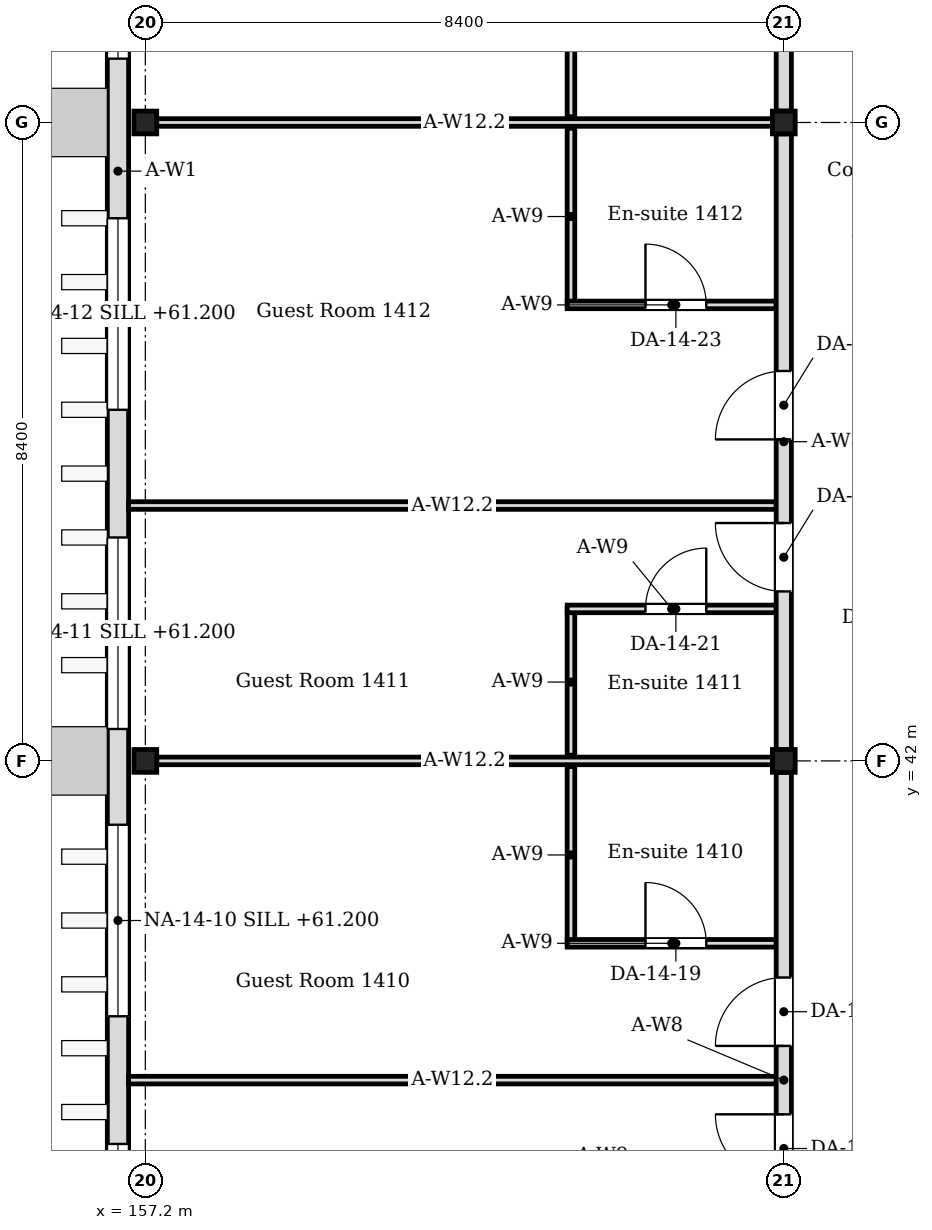
"""IFC4 building model, lengths in metres.
Left out: names, types, materials, properties, quantities, classifications, styles, units other than length and angle.
Written with IfcOpenShell. Run it as: python <this file> out.ifc"""

import sys

from ifc_helpers import new_model, si_unit, direction, frame, frame_2d, origin, origin_2d, place, context, subcontext, project, spatial, rectangle, i_section, extrude, element, fill, save


model = new_model("IFC4")
c1 = context("Model", 3, precision=1e-05, world=origin(), true_north=direction((0.0, 1.0)))
c2 = subcontext(c1, "Body", "Model", "MODEL_VIEW")
j1 = project(units=[si_unit("LENGTHUNIT", "METRE"), si_unit("PLANEANGLEUNIT", "RADIAN")], contexts=[c1])
p1 = place(None, origin())
s1 = spatial("IfcSite", under=j1, at=p1, CompositionType="ELEMENT")
p2 = place(p1, origin())
s2 = spatial("IfcBuilding", under=s1, at=p2, CompositionType="ELEMENT")
p3 = place(p2, frame((0.0, 0.0, 60.6)))
s3 = spatial("IfcBuildingStorey", under=s2, at=p3, CompositionType="ELEMENT", Elevation=60.6)
for number, where, z_axis, x_axis in (
    (1, (157.2, 42.0, 0.0), (0.0, 0.0, 1.0), (1.0, 0.0, 0.0)),
    (2, (157.2, 50.4, 0.0), (0.0, 0.0, 1.0), (1.0, 0.0, 0.0)),
    (3, (165.6, 42.0, 0.0), (0.0, 0.0, 1.0), (1.0, 0.0, 0.0)),
    (4, (165.6, 50.4, 0.0), (0.0, 0.0, 1.0), (1.0, 0.0, 0.0)),
):
    element("IfcColumn", number, at=place(p3, frame(where, z_axis=z_axis, x_axis=x_axis)), inside=s3, PredefinedType="COLUMN", context=c2, shape_type="SweptSolid", body=[
        extrude(i_section(OverallWidth=0.3, OverallDepth=0.3, WebThickness=0.01, FlangeThickness=0.015, FilletRadius=0.013, at=origin_2d()), origin(), (0.0, 0.0, 1.0), 4.2),
    ])
p4 = place(p3, frame((156.84, -0.22, 0.0), z_axis=(0.0, 0.0, 1.0), x_axis=(0.0, 1.0, 0.0)))
e5 = element("IfcWall", 5, at=p4, inside=s3, PredefinedType="SOLIDWALL", context=c2, shape_type="SweptSolid", body=[
    extrude(rectangle(XDim=67.64, YDim=0.28, at=frame_2d((33.82, 0.0))), origin(), (0.0, 0.0, 1.0), 4.05),
])
p5 = place(p4, frame((0.64, 0.0, 0.6)))
e6 = element("IfcOpeningElement", 6, at=p5, cuts=e5, PredefinedType="OPENING", context=c2, shape_type="SweptSolid", body=[
    extrude(rectangle(XDim=2.52, YDim=2.4, at=frame_2d((1.26, 1.2))), frame((0.0, 0.15, 0.0), z_axis=(0.0, -1.0, 0.0), x_axis=(1.0, 0.0, 0.0)), (0.0, 0.0, 1.0), 0.3),
])
p6 = place(p4, frame((4.84, 0.0, 0.6)))
e7 = element("IfcOpeningElement", 7, at=p6, cuts=e5, PredefinedType="OPENING", context=c2, shape_type="SweptSolid", body=[
    extrude(rectangle(XDim=2.52, YDim=2.4, at=frame_2d((1.26, 1.2))), frame((0.0, 0.15, 0.0), z_axis=(0.0, -1.0, 0.0), x_axis=(1.0, 0.0, 0.0)), (0.0, 0.0, 1.0), 0.3),
])
p7 = place(p4, frame((9.46, 0.0, 0.6)))
e8 = element("IfcOpeningElement", 8, at=p7, cuts=e5, PredefinedType="OPENING", context=c2, shape_type="SweptSolid", body=[
    extrude(rectangle(XDim=2.52, YDim=2.4, at=frame_2d((1.26, 1.2))), frame((0.0, 0.15, 0.0), z_axis=(0.0, -1.0, 0.0), x_axis=(1.0, 0.0, 0.0)), (0.0, 0.0, 1.0), 0.3),
])
p8 = place(p4, frame((13.66, 0.0, 0.6)))
e9 = element("IfcOpeningElement", 9, at=p8, cuts=e5, PredefinedType="OPENING", context=c2, shape_type="SweptSolid", body=[
    extrude(rectangle(XDim=2.52, YDim=2.4, at=frame_2d((1.26, 1.2))), frame((0.0, 0.15, 0.0), z_axis=(0.0, -1.0, 0.0), x_axis=(1.0, 0.0, 0.0)), (0.0, 0.0, 1.0), 0.3),
])
p9 = place(p4, frame((17.86, 0.0, 0.6)))
e10 = element("IfcOpeningElement", 10, at=p9, cuts=e5, PredefinedType="OPENING", context=c2, shape_type="SweptSolid", body=[
    extrude(rectangle(XDim=2.52, YDim=2.4, at=frame_2d((1.26, 1.2))), frame((0.0, 0.15, 0.0), z_axis=(0.0, -1.0, 0.0), x_axis=(1.0, 0.0, 0.0)), (0.0, 0.0, 1.0), 0.3),
])
p10 = place(p4, frame((22.06, 0.0, 0.6)))
e11 = element("IfcOpeningElement", 11, at=p10, cuts=e5, PredefinedType="OPENING", context=c2, shape_type="SweptSolid", body=[
    extrude(rectangle(XDim=2.52, YDim=2.4, at=frame_2d((1.26, 1.2))), frame((0.0, 0.15, 0.0), z_axis=(0.0, -1.0, 0.0), x_axis=(1.0, 0.0, 0.0)), (0.0, 0.0, 1.0), 0.3),
])
p11 = place(p4, frame((25.84, 0.0, 0.6)))
e12 = element("IfcOpeningElement", 12, at=p11, cuts=e5, PredefinedType="OPENING", context=c2, shape_type="SweptSolid", body=[
    extrude(rectangle(XDim=2.52, YDim=2.4, at=frame_2d((1.26, 1.2))), frame((0.0, 0.15, 0.0), z_axis=(0.0, -1.0, 0.0), x_axis=(1.0, 0.0, 0.0)), (0.0, 0.0, 1.0), 0.3),
])
p12 = place(p4, frame((30.04, 0.0, 0.6)))
e13 = element("IfcOpeningElement", 13, at=p12, cuts=e5, PredefinedType="OPENING", context=c2, shape_type="SweptSolid", body=[
    extrude(rectangle(XDim=2.52, YDim=2.4, at=frame_2d((1.26, 1.2))), frame((0.0, 0.15, 0.0), z_axis=(0.0, -1.0, 0.0), x_axis=(1.0, 0.0, 0.0)), (0.0, 0.0, 1.0), 0.3),
])
p13 = place(p4, frame((34.66, 0.0, 0.6)))
e14 = element("IfcOpeningElement", 14, at=p13, cuts=e5, PredefinedType="OPENING", context=c2, shape_type="SweptSolid", body=[
    extrude(rectangle(XDim=2.52, YDim=2.4, at=frame_2d((1.26, 1.2))), frame((0.0, 0.15, 0.0), z_axis=(0.0, -1.0, 0.0), x_axis=(1.0, 0.0, 0.0)), (0.0, 0.0, 1.0), 0.3),
])
p14 = place(p4, frame((38.86, 0.0, 0.6)))
e15 = element("IfcOpeningElement", 15, at=p14, cuts=e5, PredefinedType="OPENING", context=c2, shape_type="SweptSolid", body=[
    extrude(rectangle(XDim=2.52, YDim=2.4, at=frame_2d((1.26, 1.2))), frame((0.0, 0.15, 0.0), z_axis=(0.0, -1.0, 0.0), x_axis=(1.0, 0.0, 0.0)), (0.0, 0.0, 1.0), 0.3),
])
p15 = place(p4, frame((42.64, 0.0, 0.6)))
e16 = element("IfcOpeningElement", 16, at=p15, cuts=e5, PredefinedType="OPENING", context=c2, shape_type="SweptSolid", body=[
    extrude(rectangle(XDim=2.52, YDim=2.4, at=frame_2d((1.26, 1.2))), frame((0.0, 0.15, 0.0), z_axis=(0.0, -1.0, 0.0), x_axis=(1.0, 0.0, 0.0)), (0.0, 0.0, 1.0), 0.3),
])
p16 = place(p4, frame((46.84, 0.0, 0.6)))
e17 = element("IfcOpeningElement", 17, at=p16, cuts=e5, PredefinedType="OPENING", context=c2, shape_type="SweptSolid", body=[
    extrude(rectangle(XDim=2.52, YDim=2.4, at=frame_2d((1.26, 1.2))), frame((0.0, 0.15, 0.0), z_axis=(0.0, -1.0, 0.0), x_axis=(1.0, 0.0, 0.0)), (0.0, 0.0, 1.0), 0.3),
])
p17 = place(p4, frame((51.46, 0.0, 0.6)))
e18 = element("IfcOpeningElement", 18, at=p17, cuts=e5, PredefinedType="OPENING", context=c2, shape_type="SweptSolid", body=[
    extrude(rectangle(XDim=2.52, YDim=2.4, at=frame_2d((1.26, 1.2))), frame((0.0, 0.15, 0.0), z_axis=(0.0, -1.0, 0.0), x_axis=(1.0, 0.0, 0.0)), (0.0, 0.0, 1.0), 0.3),
])
p18 = place(p4, frame((55.66, 0.0, 0.6)))
e19 = element("IfcOpeningElement", 19, at=p18, cuts=e5, PredefinedType="OPENING", context=c2, shape_type="SweptSolid", body=[
    extrude(rectangle(XDim=2.52, YDim=2.4, at=frame_2d((1.26, 1.2))), frame((0.0, 0.15, 0.0), z_axis=(0.0, -1.0, 0.0), x_axis=(1.0, 0.0, 0.0)), (0.0, 0.0, 1.0), 0.3),
])
p19 = place(p4, frame((59.86, 0.0, 0.6)))
e20 = element("IfcOpeningElement", 20, at=p19, cuts=e5, PredefinedType="OPENING", context=c2, shape_type="SweptSolid", body=[
    extrude(rectangle(XDim=2.52, YDim=2.4, at=frame_2d((1.26, 1.2))), frame((0.0, 0.15, 0.0), z_axis=(0.0, -1.0, 0.0), x_axis=(1.0, 0.0, 0.0)), (0.0, 0.0, 1.0), 0.3),
])
p20 = place(p4, frame((64.06, 0.0, 0.6)))
e21 = element("IfcOpeningElement", 21, at=p20, cuts=e5, PredefinedType="OPENING", context=c2, shape_type="SweptSolid", body=[
    extrude(rectangle(XDim=2.52, YDim=2.4, at=frame_2d((1.26, 1.2))), frame((0.0, 0.15, 0.0), z_axis=(0.0, -1.0, 0.0), x_axis=(1.0, 0.0, 0.0)), (0.0, 0.0, 1.0), 0.3),
])
p21 = place(p3, frame((162.8, 39.6, 0.0), z_axis=(0.0, 0.0, 1.0), x_axis=(0.0, 1.0, 0.0)))
e22 = element("IfcWall", 22, at=p21, inside=s3, PredefinedType="PARTITIONING", context=c2, shape_type="SweptSolid", body=[
    extrude(rectangle(XDim=2.325, YDim=0.1, at=frame_2d((1.163, 0.0))), origin(), (0.0, 0.0, 1.0), 4.05),
])
p22 = place(p3, frame((162.75, 39.6, 0.0), z_axis=(0.0, 0.0, 1.0), x_axis=(1.0, 0.0, 0.0)))
e23 = element("IfcWall", 23, at=p22, inside=s3, PredefinedType="PARTITIONING", context=c2, shape_type="SweptSolid", body=[
    extrude(rectangle(XDim=2.75, YDim=0.1, at=frame_2d((1.375, 0.0))), origin(), (0.0, 0.0, 1.0), 4.05),
])
p23 = place(p22, frame((1.03, 0.0, 0.0)))
e24 = element("IfcOpeningElement", 24, at=p23, cuts=e23, PredefinedType="OPENING", context=c2, shape_type="SweptSolid", body=[
    extrude(rectangle(XDim=0.8, YDim=2.1, at=frame_2d((0.4, 1.05))), frame((0.0, 0.06, 0.0), z_axis=(0.0, -1.0, 0.0), x_axis=(1.0, 0.0, 0.0)), (0.0, 0.0, 1.0), 0.12),
])
p24 = place(p3, frame((162.8, 42.075, 0.0), z_axis=(0.0, 0.0, 1.0), x_axis=(0.0, 1.0, 0.0)))
e25 = element("IfcWall", 25, at=p24, inside=s3, PredefinedType="PARTITIONING", context=c2, shape_type="SweptSolid", body=[
    extrude(rectangle(XDim=1.925, YDim=0.1, at=frame_2d((0.962, 0.0))), origin(), (0.0, 0.0, 1.0), 4.05),
])
p25 = place(p3, frame((162.75, 44.0, 0.0), z_axis=(0.0, 0.0, 1.0), x_axis=(1.0, 0.0, 0.0)))
e26 = element("IfcWall", 26, at=p25, inside=s3, PredefinedType="PARTITIONING", context=c2, shape_type="SweptSolid", body=[
    extrude(rectangle(XDim=2.75, YDim=0.1, at=frame_2d((1.375, 0.0))), origin(), (0.0, 0.0, 1.0), 4.05),
])
p26 = place(p25, frame((1.03, 0.0, 0.0)))
e27 = element("IfcOpeningElement", 27, at=p26, cuts=e26, PredefinedType="OPENING", context=c2, shape_type="SweptSolid", body=[
    extrude(rectangle(XDim=0.8, YDim=2.1, at=frame_2d((0.4, 1.05))), frame((0.0, 0.06, 0.0), z_axis=(0.0, -1.0, 0.0), x_axis=(1.0, 0.0, 0.0)), (0.0, 0.0, 1.0), 0.12),
])
p27 = place(p3, frame((162.8, 48.0, 0.0), z_axis=(0.0, 0.0, 1.0), x_axis=(0.0, 1.0, 0.0)))
e28 = element("IfcWall", 28, at=p27, inside=s3, PredefinedType="PARTITIONING", context=c2, shape_type="SweptSolid", body=[
    extrude(rectangle(XDim=2.325, YDim=0.1, at=frame_2d((1.163, 0.0))), origin(), (0.0, 0.0, 1.0), 4.05),
])
p28 = place(p3, frame((162.75, 48.0, 0.0), z_axis=(0.0, 0.0, 1.0), x_axis=(1.0, 0.0, 0.0)))
e29 = element("IfcWall", 29, at=p28, inside=s3, PredefinedType="PARTITIONING", context=c2, shape_type="SweptSolid", body=[
    extrude(rectangle(XDim=2.75, YDim=0.1, at=frame_2d((1.375, 0.0))), origin(), (0.0, 0.0, 1.0), 4.05),
])
p29 = place(p28, frame((1.03, 0.0, 0.0)))
e30 = element("IfcOpeningElement", 30, at=p29, cuts=e29, PredefinedType="OPENING", context=c2, shape_type="SweptSolid", body=[
    extrude(rectangle(XDim=0.8, YDim=2.1, at=frame_2d((0.4, 1.05))), frame((0.0, 0.06, 0.0), z_axis=(0.0, -1.0, 0.0), x_axis=(1.0, 0.0, 0.0)), (0.0, 0.0, 1.0), 0.12),
])
p30 = place(p3, frame((162.8, 50.475, 0.0), z_axis=(0.0, 0.0, 1.0), x_axis=(0.0, 1.0, 0.0)))
e31 = element("IfcWall", 31, at=p30, inside=s3, PredefinedType="PARTITIONING", context=c2, shape_type="SweptSolid", body=[
    extrude(rectangle(XDim=2.325, YDim=0.1, at=frame_2d((1.163, 0.0))), origin(), (0.0, 0.0, 1.0), 4.05),
])
for number, where, z_axis, x_axis in (
    (32, (157.35, 42.0, 0.0), (0.0, 0.0, 1.0), (1.0, 0.0, 0.0)),
    (33, (157.35, 50.4, 0.0), (0.0, 0.0, 1.0), (1.0, 0.0, 0.0)),
):
    element("IfcWall", number, at=place(p3, frame(where, z_axis=z_axis, x_axis=x_axis)), inside=s3, PredefinedType="PARTITIONING", context=c2, shape_type="SweptSolid", body=[
        extrude(rectangle(XDim=8.1, YDim=0.1, at=frame_2d((4.05, 0.0))), origin(), (0.0, 0.0, 1.0), 3.55),
    ])
for number, where, z_axis, x_axis in (
    (34, (156.98, 37.8, 0.0), (0.0, 0.0, 1.0), (1.0, 0.0, 0.0)),
    (35, (156.98, 45.36, 0.0), (0.0, 0.0, 1.0), (1.0, 0.0, 0.0)),
):
    element("IfcWall", number, at=place(p3, frame(where, z_axis=z_axis, x_axis=x_axis)), inside=s3, PredefinedType="PARTITIONING", context=c2, shape_type="SweptSolid", body=[
        extrude(rectangle(XDim=8.52, YDim=0.1, at=frame_2d((4.26, 0.0))), origin(), (0.0, 0.0, 1.0), 3.55),
    ])
p31 = place(p3, frame((165.6, 33.75, 0.0), z_axis=(0.0, 0.0, 1.0), x_axis=(0.0, 1.0, 0.0)))
e36 = element("IfcWall", 36, at=p31, inside=s3, PredefinedType="PARTITIONING", context=c2, shape_type="SweptSolid", body=[
    extrude(rectangle(XDim=8.1, YDim=0.2, at=frame_2d((4.05, 0.0))), origin(), (0.0, 0.0, 1.0), 3.45),
])
p32 = place(p31, frame((2.7, 0.0, 0.0)))
e37 = element("IfcOpeningElement", 37, at=p32, cuts=e36, PredefinedType="OPENING", context=c2, shape_type="SweptSolid", body=[
    extrude(rectangle(XDim=0.9, YDim=2.1, at=frame_2d((0.45, 1.05))), frame((0.0, 0.11, 0.0), z_axis=(0.0, -1.0, 0.0), x_axis=(1.0, 0.0, 0.0)), (0.0, 0.0, 1.0), 0.22),
])
p33 = place(p31, frame((4.5, 0.0, 0.0)))
e38 = element("IfcOpeningElement", 38, at=p33, cuts=e36, PredefinedType="OPENING", context=c2, shape_type="SweptSolid", body=[
    extrude(rectangle(XDim=0.9, YDim=2.1, at=frame_2d((0.45, 1.05))), frame((0.0, 0.11, 0.0), z_axis=(0.0, -1.0, 0.0), x_axis=(1.0, 0.0, 0.0)), (0.0, 0.0, 1.0), 0.22),
])
p34 = place(p3, frame((165.6, 42.15, 0.0), z_axis=(0.0, 0.0, 1.0), x_axis=(0.0, 1.0, 0.0)))
e39 = element("IfcWall", 39, at=p34, inside=s3, PredefinedType="PARTITIONING", context=c2, shape_type="SweptSolid", body=[
    extrude(rectangle(XDim=8.1, YDim=0.2, at=frame_2d((4.05, 0.0))), origin(), (0.0, 0.0, 1.0), 3.45),
])
p35 = place(p34, frame((2.08, 0.0, 0.0)))
e40 = element("IfcOpeningElement", 40, at=p35, cuts=e39, PredefinedType="OPENING", context=c2, shape_type="SweptSolid", body=[
    extrude(rectangle(XDim=0.9, YDim=2.1, at=frame_2d((0.45, 1.05))), frame((0.0, 0.11, 0.0), z_axis=(0.0, -1.0, 0.0), x_axis=(1.0, 0.0, 0.0)), (0.0, 0.0, 1.0), 0.22),
])
p36 = place(p34, frame((4.08, 0.0, 0.0)))
e41 = element("IfcOpeningElement", 41, at=p36, cuts=e39, PredefinedType="OPENING", context=c2, shape_type="SweptSolid", body=[
    extrude(rectangle(XDim=0.9, YDim=2.1, at=frame_2d((0.45, 1.05))), frame((0.0, 0.11, 0.0), z_axis=(0.0, -1.0, 0.0), x_axis=(1.0, 0.0, 0.0)), (0.0, 0.0, 1.0), 0.22),
])
p37 = place(p3, frame((165.6, 50.55, 0.0), z_axis=(0.0, 0.0, 1.0), x_axis=(0.0, 1.0, 0.0)))
e42 = element("IfcWall", 42, at=p37, inside=s3, PredefinedType="PARTITIONING", context=c2, shape_type="SweptSolid", body=[
    extrude(rectangle(XDim=8.1, YDim=0.2, at=frame_2d((4.05, 0.0))), origin(), (0.0, 0.0, 1.0), 3.45),
])
p38 = place(p37, frame((2.7, 0.0, 0.0)))
e43 = element("IfcOpeningElement", 43, at=p38, cuts=e42, PredefinedType="OPENING", context=c2, shape_type="SweptSolid", body=[
    extrude(rectangle(XDim=0.9, YDim=2.1, at=frame_2d((0.45, 1.05))), frame((0.0, 0.11, 0.0), z_axis=(0.0, -1.0, 0.0), x_axis=(1.0, 0.0, 0.0)), (0.0, 0.0, 1.0), 0.22),
])
p39 = place(p37, frame((4.5, 0.0, 0.0)))
e44 = element("IfcOpeningElement", 44, at=p39, cuts=e42, PredefinedType="OPENING", context=c2, shape_type="SweptSolid", body=[
    extrude(rectangle(XDim=0.9, YDim=2.1, at=frame_2d((0.45, 1.05))), frame((0.0, 0.11, 0.0), z_axis=(0.0, -1.0, 0.0), x_axis=(1.0, 0.0, 0.0)), (0.0, 0.0, 1.0), 0.22),
])
p40 = place(p13, origin())
e45 = element("IfcWindow", 45, at=p40, inside=s3, PartitioningType="SINGLE_PANEL", PredefinedType="WINDOW", context=c2, shape_type="SweptSolid", body=[
    extrude(rectangle(XDim=2.52, YDim=2.4, at=frame_2d((1.26, 1.2))), frame((0.0, 0.03, 0.0), z_axis=(0.0, -1.0, 0.0), x_axis=(1.0, 0.0, 0.0)), (0.0, 0.0, 1.0), 0.06),
])
fill(e14, e45)
p41 = place(p14, origin())
e46 = element("IfcWindow", 46, at=p41, inside=s3, PartitioningType="SINGLE_PANEL", PredefinedType="WINDOW", context=c2, shape_type="SweptSolid", body=[
    extrude(rectangle(XDim=2.52, YDim=2.4, at=frame_2d((1.26, 1.2))), frame((0.0, 0.03, 0.0), z_axis=(0.0, -1.0, 0.0), x_axis=(1.0, 0.0, 0.0)), (0.0, 0.0, 1.0), 0.06),
])
fill(e15, e46)
p42 = place(p15, origin())
e47 = element("IfcWindow", 47, at=p42, inside=s3, PartitioningType="SINGLE_PANEL", PredefinedType="WINDOW", context=c2, shape_type="SweptSolid", body=[
    extrude(rectangle(XDim=2.52, YDim=2.4, at=frame_2d((1.26, 1.2))), frame((0.0, 0.03, 0.0), z_axis=(0.0, -1.0, 0.0), x_axis=(1.0, 0.0, 0.0)), (0.0, 0.0, 1.0), 0.06),
])
fill(e16, e47)
p43 = place(p16, origin())
e48 = element("IfcWindow", 48, at=p43, inside=s3, PartitioningType="SINGLE_PANEL", PredefinedType="WINDOW", context=c2, shape_type="SweptSolid", body=[
    extrude(rectangle(XDim=2.52, YDim=2.4, at=frame_2d((1.26, 1.2))), frame((0.0, 0.03, 0.0), z_axis=(0.0, -1.0, 0.0), x_axis=(1.0, 0.0, 0.0)), (0.0, 0.0, 1.0), 0.06),
])
fill(e17, e48)
p44 = place(p17, origin())
e49 = element("IfcWindow", 49, at=p44, inside=s3, PartitioningType="SINGLE_PANEL", PredefinedType="WINDOW", context=c2, shape_type="SweptSolid", body=[
    extrude(rectangle(XDim=2.52, YDim=2.4, at=frame_2d((1.26, 1.2))), frame((0.0, 0.03, 0.0), z_axis=(0.0, -1.0, 0.0), x_axis=(1.0, 0.0, 0.0)), (0.0, 0.0, 1.0), 0.06),
])
fill(e18, e49)
p45 = place(p32, origin())
e50 = element("IfcDoor", 50, at=p45, inside=s3, OperationType="SINGLE_SWING_RIGHT", PredefinedType="DOOR", context=c2, shape_type="SweptSolid", body=[
    extrude(rectangle(XDim=0.9, YDim=2.1, at=frame_2d((0.45, 1.05))), frame((0.0, 0.025, 0.0), z_axis=(0.0, -1.0, 0.0), x_axis=(1.0, 0.0, 0.0)), (0.0, 0.0, 1.0), 0.05),
])
fill(e37, e50)
p46 = place(p23, origin())
e51 = element("IfcDoor", 51, at=p46, inside=s3, OperationType="SINGLE_SWING_LEFT", PredefinedType="DOOR", context=c2, shape_type="SweptSolid", body=[
    extrude(rectangle(XDim=0.8, YDim=2.1, at=frame_2d((0.4, 1.05))), frame((0.0, 0.025, 0.0), z_axis=(0.0, -1.0, 0.0), x_axis=(1.0, 0.0, 0.0)), (0.0, 0.0, 1.0), 0.05),
])
fill(e24, e51)
p47 = place(p33, origin())
e52 = element("IfcDoor", 52, at=p47, inside=s3, OperationType="SINGLE_SWING_LEFT", PredefinedType="DOOR", context=c2, shape_type="SweptSolid", body=[
    extrude(rectangle(XDim=0.9, YDim=2.1, at=frame_2d((0.45, 1.05))), frame((0.0, 0.025, 0.0), z_axis=(0.0, -1.0, 0.0), x_axis=(1.0, 0.0, 0.0)), (0.0, 0.0, 1.0), 0.05),
])
fill(e38, e52)
p48 = place(p26, origin())
e53 = element("IfcDoor", 53, at=p48, inside=s3, OperationType="SINGLE_SWING_RIGHT", PredefinedType="DOOR", context=c2, shape_type="SweptSolid", body=[
    extrude(rectangle(XDim=0.8, YDim=2.1, at=frame_2d((0.4, 1.05))), frame((0.0, 0.025, 0.0), z_axis=(0.0, -1.0, 0.0), x_axis=(1.0, 0.0, 0.0)), (0.0, 0.0, 1.0), 0.05),
])
fill(e27, e53)
p49 = place(p35, origin())
e54 = element("IfcDoor", 54, at=p49, inside=s3, OperationType="SINGLE_SWING_RIGHT", PredefinedType="DOOR", context=c2, shape_type="SweptSolid", body=[
    extrude(rectangle(XDim=0.9, YDim=2.1, at=frame_2d((0.45, 1.05))), frame((0.0, 0.025, 0.0), z_axis=(0.0, -1.0, 0.0), x_axis=(1.0, 0.0, 0.0)), (0.0, 0.0, 1.0), 0.05),
])
fill(e40, e54)
p50 = place(p29, origin())
e55 = element("IfcDoor", 55, at=p50, inside=s3, OperationType="SINGLE_SWING_LEFT", PredefinedType="DOOR", context=c2, shape_type="SweptSolid", body=[
    extrude(rectangle(XDim=0.8, YDim=2.1, at=frame_2d((0.4, 1.05))), frame((0.0, 0.025, 0.0), z_axis=(0.0, -1.0, 0.0), x_axis=(1.0, 0.0, 0.0)), (0.0, 0.0, 1.0), 0.05),
])
fill(e30, e55)
p51 = place(p36, origin())
e56 = element("IfcDoor", 56, at=p51, inside=s3, OperationType="SINGLE_SWING_LEFT", PredefinedType="DOOR", context=c2, shape_type="SweptSolid", body=[
    extrude(rectangle(XDim=0.9, YDim=2.1, at=frame_2d((0.45, 1.05))), frame((0.0, 0.025, 0.0), z_axis=(0.0, -1.0, 0.0), x_axis=(1.0, 0.0, 0.0)), (0.0, 0.0, 1.0), 0.05),
])
fill(e41, e56)
save(model, sys.argv[1])
